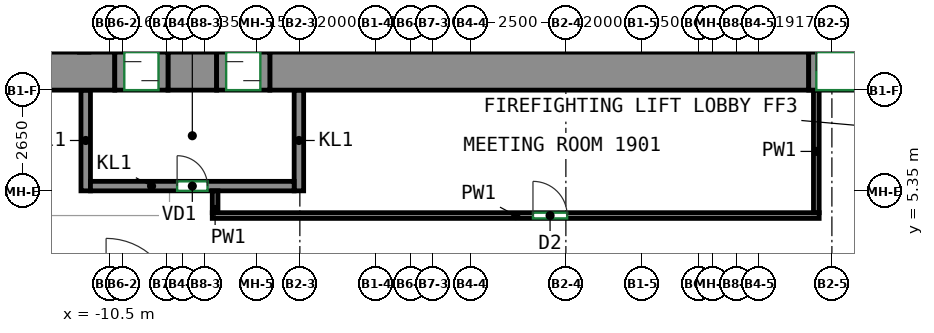
"""IFC4 building model, lengths in metres.
Left out: names, types, materials, properties, quantities, classifications, styles, units other than length and angle.
Written with IfcOpenShell. Run it as: python <this file> out.ifc"""

import sys

from ifc_helpers import new_model, si_unit, direction, frame, frame_2d, origin, place, context, subcontext, project, spatial, rectangle, extrude, source, transform, mapped, element, fill, save


model = new_model("IFC4")
c1 = context("Model", 3, precision=1e-05, world=origin(), true_north=direction((0.0, 1.0)))
c2 = subcontext(c1, "Body", "Model", "MODEL_VIEW")
j1 = project(units=[si_unit("LENGTHUNIT", "METRE"), si_unit("PLANEANGLEUNIT", "RADIAN")], contexts=[c1])
p1 = place(None, origin())
s1 = spatial("IfcSite", under=j1, at=p1, CompositionType="ELEMENT")
p2 = place(p1, origin())
s2 = spatial("IfcBuilding", under=s1, at=p2, CompositionType="ELEMENT")
p3 = place(p2, frame((0.0, 0.0, 83.2)))
s3 = spatial("IfcBuildingStorey", under=s2, at=p3, CompositionType="ELEMENT", Elevation=83.2)
m1 = source(origin(), c2, "Body", "SweptSolid", [
    extrude(rectangle(XDim=5.63, YDim=1.0, at=frame_2d((2.815, 0.0))), origin(), (0.0, 0.0, 1.0), 3.72),
])
p4 = place(p3, frame((-16.0, 8.5, 0.0), z_axis=(0.0, 0.0, 1.0), x_axis=(1.0, 0.0, 0.0)))
e1 = element("IfcWall", 1, at=p4, inside=s3, PredefinedType="SHEAR", context=c2, shape_type="MappedRepresentation", body=[
    mapped(m1, transform((0.0, 0.0, 0.0))),
])
p5 = place(p4, frame((2.25, 0.0, 0.0)))
e2 = element("IfcOpeningElement", 2, at=p5, cuts=e1, PredefinedType="OPENING", context=c2, shape_type="SweptSolid", body=[
    extrude(rectangle(XDim=1.2, YDim=2.1, at=frame_2d((0.6, 1.05))), frame((0.0, 0.51, 0.0), z_axis=(0.0, -1.0, 0.0), x_axis=(1.0, 0.0, 0.0)), (0.0, 0.0, 1.0), 1.02),
])
m2 = source(origin(), c2, "Body", "SweptSolid", [
    extrude(rectangle(XDim=1.28, YDim=1.0, at=frame_2d((0.64, 0.0))), origin(), (0.0, 0.0, 1.0), 3.72),
])
p6 = place(p3, frame((-8.97, 8.5, 0.0), z_axis=(0.0, 0.0, 1.0), x_axis=(1.0, 0.0, 0.0)))
e3 = element("IfcWall", 3, at=p6, inside=s3, PredefinedType="SHEAR", context=c2, shape_type="MappedRepresentation", body=[
    mapped(m2, transform((0.0, 0.0, 0.0))),
])
m3 = source(origin(), c2, "Body", "SweptSolid", [
    extrude(rectangle(XDim=14.18, YDim=1.0, at=frame_2d((7.09, 0.0))), origin(), (0.0, 0.0, 1.0), 3.72),
])
p7 = place(p3, frame((-6.29, 8.5, 0.0), z_axis=(0.0, 0.0, 1.0), x_axis=(1.0, 0.0, 0.0)))
e4 = element("IfcWall", 4, at=p7, inside=s3, PredefinedType="SHEAR", context=c2, shape_type="MappedRepresentation", body=[
    mapped(m3, transform((0.0, 0.0, 0.0))),
])
m4 = source(origin(), c2, "Body", "SweptSolid", [
    extrude(rectangle(XDim=2.65, YDim=0.25, at=frame_2d((1.325, 0.0))), origin(), (0.0, 0.0, 1.0), 3.72),
])
for number, where, z_axis, x_axis in (
    (5, (-11.135, 5.35, 0.0), (0.0, 0.0, 1.0), (0.0, 1.0, 0.0)),
    (6, (-5.525, 5.35, 0.0), (0.0, 0.0, 1.0), (0.0, 1.0, 0.0)),
):
    element("IfcWall", number, at=place(p3, frame(where, z_axis=z_axis, x_axis=x_axis)), inside=s3, PredefinedType="PARTITIONING", context=c2, shape_type="MappedRepresentation", body=[
        mapped(m4, transform((0.0, 0.0, 0.0))),
    ])
m5 = source(origin(), c2, "Body", "SweptSolid", [
    extrude(rectangle(XDim=5.36, YDim=0.25, at=frame_2d((2.68, 0.0))), origin(), (0.0, 0.0, 1.0), 3.72),
])
p8 = place(p3, frame((-11.01, 5.475, 0.0), z_axis=(0.0, 0.0, 1.0), x_axis=(1.0, 0.0, 0.0)))
e7 = element("IfcWall", 7, at=p8, inside=s3, PredefinedType="PARTITIONING", context=c2, shape_type="MappedRepresentation", body=[
    mapped(m5, transform((0.0, 0.0, 0.0))),
])
p9 = place(p8, frame((2.28, 0.0, 0.0)))
e8 = element("IfcOpeningElement", 8, at=p9, cuts=e7, PredefinedType="OPENING", context=c2, shape_type="SweptSolid", body=[
    extrude(rectangle(XDim=0.8, YDim=2.0, at=frame_2d((0.4, 1.0))), frame((0.0, 0.135, 0.0), z_axis=(0.0, -1.0, 0.0), x_axis=(1.0, 0.0, 0.0)), (0.0, 0.0, 1.0), 0.27),
])
m6 = source(origin(), c2, "Body", "SweptSolid", [
    extrude(rectangle(XDim=1.4, YDim=1.0, at=frame_2d((0.7, 0.0))), origin(), (0.0, 0.0, 1.0), 2.7),
])
p10 = place(p3, frame((-10.37, 8.5, 0.0), z_axis=(0.0, 0.0, 1.0), x_axis=(1.0, 0.0, 0.0)))
e9 = element("IfcWall", 9, at=p10, inside=s3, PredefinedType="PARTITIONING", context=c2, shape_type="MappedRepresentation", body=[
    mapped(m6, transform((0.0, 0.0, 0.0))),
])
p11 = place(p10, frame((0.25, 0.0, 0.0)))
e10 = element("IfcOpeningElement", 10, at=p11, cuts=e9, PredefinedType="OPENING", context=c2, shape_type="SweptSolid", body=[
    extrude(rectangle(XDim=0.9, YDim=2.1, at=frame_2d((0.45, 1.05))), frame((0.0, 0.51, 0.0), z_axis=(0.0, -1.0, 0.0), x_axis=(1.0, 0.0, 0.0)), (0.0, 0.0, 1.0), 1.02),
])
m7 = source(origin(), c2, "Body", "SweptSolid", [
    extrude(rectangle(XDim=1.4, YDim=1.0, at=frame_2d((0.7, 0.0))), origin(), (0.0, 0.0, 1.0), 2.7),
])
p12 = place(p3, frame((-7.69, 8.5, 0.0), z_axis=(0.0, 0.0, 1.0), x_axis=(1.0, 0.0, 0.0)))
e11 = element("IfcWall", 11, at=p12, inside=s3, PredefinedType="PARTITIONING", context=c2, shape_type="MappedRepresentation", body=[
    mapped(m7, transform((0.0, 0.0, 0.0))),
])
p13 = place(p12, frame((0.25, 0.0, 0.0)))
e12 = element("IfcOpeningElement", 12, at=p13, cuts=e11, PredefinedType="OPENING", context=c2, shape_type="SweptSolid", body=[
    extrude(rectangle(XDim=0.9, YDim=2.1, at=frame_2d((0.45, 1.05))), frame((0.0, 0.51, 0.0), z_axis=(0.0, -1.0, 0.0), x_axis=(1.0, 0.0, 0.0)), (0.0, 0.0, 1.0), 1.02),
])
m8 = source(origin(), c2, "Body", "SweptSolid", [
    extrude(rectangle(XDim=2.4, YDim=1.0, at=frame_2d((1.2, 0.0))), origin(), (0.0, 0.0, 1.0), 2.7),
])
p14 = place(p3, frame((7.89, 8.5, 0.0), z_axis=(0.0, 0.0, 1.0), x_axis=(1.0, 0.0, 0.0)))
e13 = element("IfcWall", 13, at=p14, inside=s3, PredefinedType="PARTITIONING", context=c2, shape_type="MappedRepresentation", body=[
    mapped(m8, transform((0.0, 0.0, 0.0))),
])
p15 = place(p14, frame((0.2, 0.0, 0.0)))
e14 = element("IfcOpeningElement", 14, at=p15, cuts=e13, PredefinedType="OPENING", context=c2, shape_type="SweptSolid", body=[
    extrude(rectangle(XDim=2.0, YDim=2.1, at=frame_2d((1.0, 1.05))), frame((0.0, 0.51, 0.0), z_axis=(0.0, -1.0, 0.0), x_axis=(1.0, 0.0, 0.0)), (0.0, 0.0, 1.0), 1.02),
])
p16 = place(p3, frame((-7.73, 4.775, 0.0), z_axis=(0.0, 0.0, 1.0), x_axis=(0.0, 1.0, 0.0)))
e15 = element("IfcWall", 15, at=p16, inside=s3, PredefinedType="PARTITIONING", context=c2, shape_type="SweptSolid", body=[
    extrude(rectangle(XDim=0.575, YDim=0.15, at=frame_2d((0.288, 0.0))), origin(), (0.0, 0.0, 1.0), 3.72),
])
p17 = place(p3, frame((-7.805, 4.7, 0.0), z_axis=(0.0, 0.0, 1.0), x_axis=(1.0, 0.0, 0.0)))
e16 = element("IfcWall", 16, at=p17, inside=s3, PredefinedType="PARTITIONING", context=c2, shape_type="SweptSolid", body=[
    extrude(rectangle(XDim=15.97, YDim=0.15, at=frame_2d((7.985, 0.0))), origin(), (0.0, 0.0, 1.0), 3.72),
])
p18 = place(p17, frame((8.439, 0.0, 0.0)))
e17 = element("IfcOpeningElement", 17, at=p18, cuts=e16, PredefinedType="OPENING", context=c2, shape_type="SweptSolid", body=[
    extrude(rectangle(XDim=0.9, YDim=2.1, at=frame_2d((0.45, 1.05))), frame((0.0, 0.085, 0.0), z_axis=(0.0, -1.0, 0.0), x_axis=(1.0, 0.0, 0.0)), (0.0, 0.0, 1.0), 0.17),
])
p19 = place(p3, frame((8.09, 8.0, 0.0), z_axis=(0.0, 0.0, 1.0), x_axis=(0.0, -1.0, 0.0)))
e18 = element("IfcWall", 18, at=p19, inside=s3, PredefinedType="PARTITIONING", context=c2, shape_type="SweptSolid", body=[
    extrude(rectangle(XDim=3.225, YDim=0.15, at=frame_2d((1.613, 0.0))), origin(), (0.0, 0.0, 1.0), 3.72),
])
p20 = place(p15, origin())
e19 = element("IfcDoor", 19, at=p20, inside=s3, OperationType="DOUBLE_DOOR_SINGLE_SWING", PredefinedType="DOOR", context=c2, shape_type="SweptSolid", body=[
    extrude(rectangle(XDim=2.0, YDim=2.1, at=frame_2d((1.0, 1.05))), frame((0.0, 0.405, 0.0), z_axis=(0.0, -1.0, 0.0), x_axis=(1.0, 0.0, 0.0)), (0.0, 0.0, 1.0), 0.05),
])
fill(e14, e19)
p21 = place(p9, origin())
e20 = element("IfcDoor", 20, at=p21, inside=s3, OperationType="SINGLE_SWING_LEFT", PredefinedType="DOOR", context=c2, shape_type="SweptSolid", body=[
    extrude(rectangle(XDim=0.8, YDim=2.0, at=frame_2d((0.4, 1.0))), frame((0.0, 0.025, 0.0), z_axis=(0.0, -1.0, 0.0), x_axis=(1.0, 0.0, 0.0)), (0.0, 0.0, 1.0), 0.05),
])
fill(e8, e20)
p22 = place(p11, origin())
e21 = element("IfcDoor", 21, at=p22, inside=s3, OperationType="SLIDING_TO_LEFT", PredefinedType="DOOR", context=c2, shape_type="SweptSolid", body=[
    extrude(rectangle(XDim=0.9, YDim=2.1, at=frame_2d((0.45, 1.05))), frame((0.0, 0.405, 0.0), z_axis=(0.0, -1.0, 0.0), x_axis=(1.0, 0.0, 0.0)), (0.0, 0.0, 1.0), 0.05),
])
fill(e10, e21)
p23 = place(p13, origin())
e22 = element("IfcDoor", 22, at=p23, inside=s3, OperationType="SLIDING_TO_RIGHT", PredefinedType="DOOR", context=c2, shape_type="SweptSolid", body=[
    extrude(rectangle(XDim=0.9, YDim=2.1, at=frame_2d((0.45, 1.05))), frame((0.0, 0.405, 0.0), z_axis=(0.0, -1.0, 0.0), x_axis=(1.0, 0.0, 0.0)), (0.0, 0.0, 1.0), 0.05),
])
fill(e12, e22)
p24 = place(p18, origin())
e23 = element("IfcDoor", 23, at=p24, inside=s3, OperationType="SINGLE_SWING_LEFT", PredefinedType="DOOR", context=c2, shape_type="SweptSolid", body=[
    extrude(rectangle(XDim=0.9, YDim=2.1, at=frame_2d((0.45, 1.05))), frame((0.0, 0.025, 0.0), z_axis=(0.0, -1.0, 0.0), x_axis=(1.0, 0.0, 0.0)), (0.0, 0.0, 1.0), 0.05),
])
fill(e17, e23)
save(model, sys.argv[1])
